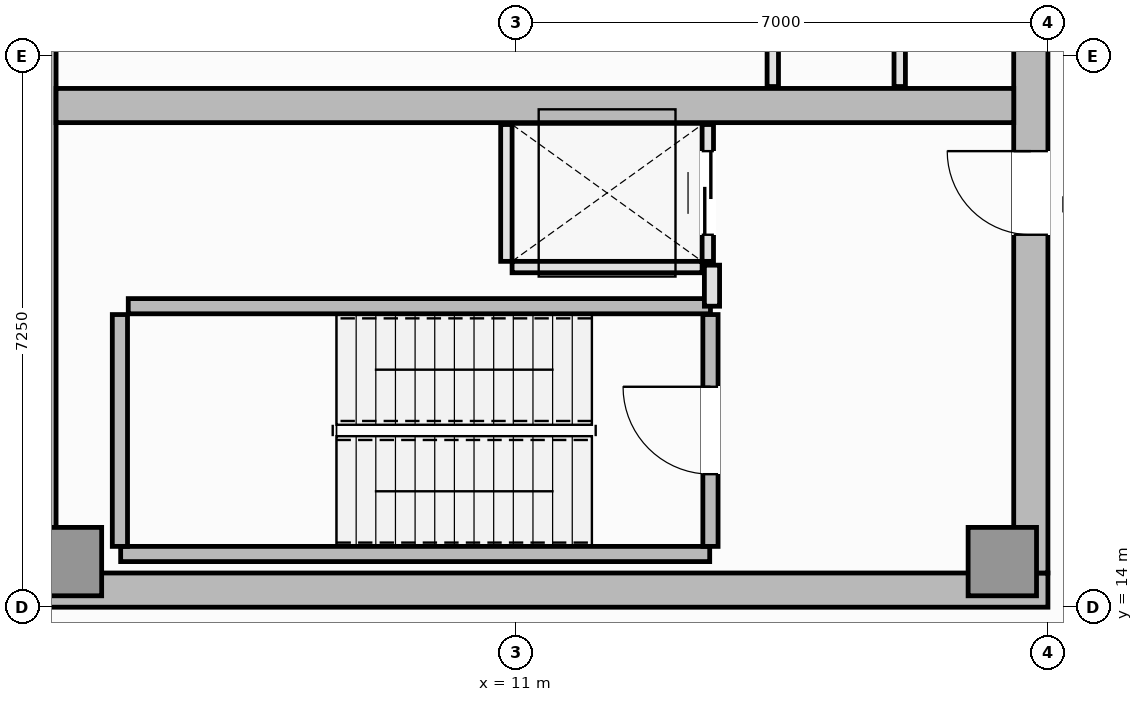
"""IFC4 building model, lengths in metres.
Left out: names, types, materials, properties, quantities, classifications, styles, units other than length and angle.
Written with IfcOpenShell. Run it as: python <this file> out.ifc"""

import sys

from ifc_helpers import new_model, si_unit, direction, frame, frame_2d, origin, origin_2d, place, context, subcontext, project, spatial, rectangle, extrude, element, fill, save


model = new_model("IFC4")
c1 = context("Model", 3, precision=1e-05, world=origin(), true_north=direction((0.0, 1.0)))
c2 = subcontext(c1, "Body", "Model", "MODEL_VIEW")
j1 = project(units=[si_unit("LENGTHUNIT", "METRE"), si_unit("PLANEANGLEUNIT", "RADIAN")], contexts=[c1])
p1 = place(None, origin())
s1 = spatial("IfcSite", under=j1, at=p1, CompositionType="ELEMENT")
p2 = place(p1, origin())
s2 = spatial("IfcBuilding", under=s1, at=p2, CompositionType="ELEMENT")
p3 = place(p2, frame((0.0, 0.0, 303.05)))
s3 = spatial("IfcBuildingStorey", under=s2, at=p3, CompositionType="ELEMENT", Elevation=303.05)
p4 = place(p3, frame((4.5, 14.225, 0.0), z_axis=(0.0, 0.0, 1.0), x_axis=(1.0, 0.0, 0.0)))
e1 = element("IfcWall", 1, at=p4, inside=s3, PredefinedType="SHEAR", context=c2, shape_type="SweptSolid", body=[
    extrude(rectangle(XDim=13.5, YDim=0.45, at=frame_2d((6.75, 0.0))), origin(), (0.0, 0.0, 1.0), 4.5),
])
p5 = place(p3, frame((4.725, 14.45, 0.0), z_axis=(0.0, 0.0, 1.0), x_axis=(0.0, 1.0, 0.0)))
e2 = element("IfcWall", 2, at=p5, inside=s3, PredefinedType="SHEAR", context=c2, shape_type="SweptSolid", body=[
    extrude(rectangle(XDim=21.6, YDim=0.45, at=frame_2d((10.8, 0.0))), origin(), (0.0, 0.0, 1.0), 4.5),
])
p6 = place(p3, frame((17.775, 14.45, 0.0), z_axis=(0.0, 0.0, 1.0), x_axis=(0.0, 1.0, 0.0)))
e3 = element("IfcWall", 3, at=p6, inside=s3, PredefinedType="SHEAR", context=c2, shape_type="SweptSolid", body=[
    extrude(rectangle(XDim=9.0, YDim=0.45, at=frame_2d((4.5, 0.0))), origin(), (0.0, 0.0, 1.0), 4.5),
])
p7 = place(p6, frame((4.45, 0.0, 0.0)))
e4 = element("IfcOpeningElement", 4, at=p7, cuts=e3, PredefinedType="OPENING", context=c2, shape_type="SweptSolid", body=[
    extrude(rectangle(XDim=1.1, YDim=2.15, at=frame_2d((0.55, 1.075))), frame((0.0, 0.235, 0.0), z_axis=(0.0, -1.0, 0.0), x_axis=(1.0, 0.0, 0.0)), (0.0, 0.0, 1.0), 0.47),
])
p8 = place(p3, frame((4.95, 20.6, 0.0), z_axis=(0.0, 0.0, 1.0), x_axis=(1.0, 0.0, 0.0)))
e5 = element("IfcWall", 5, at=p8, inside=s3, PredefinedType="SHEAR", context=c2, shape_type="SweptSolid", body=[
    extrude(rectangle(XDim=12.6, YDim=0.45, at=frame_2d((6.3, 0.0))), origin(), (0.0, 0.0, 1.0), 4.5),
])
for number, where, z_axis, x_axis in (
    (6, (5.1, 14.6, 0.0), (0.0, 0.0, 1.0), (1.0, 0.0, 0.0)),
    (7, (17.4, 14.6, 0.0), (0.0, 0.0, 1.0), (1.0, 0.0, 0.0)),
):
    element("IfcColumn", number, at=place(p3, frame(where, z_axis=z_axis, x_axis=x_axis)), inside=s3, PredefinedType="PILASTER", context=c2, shape_type="SweptSolid", body=[
        extrude(rectangle(XDim=0.9, YDim=0.9, at=origin_2d()), origin(), (0.0, 0.0, 1.0), 4.5),
    ])
p9 = place(p3, frame((5.8, 14.7, 0.0), z_axis=(0.0, 0.0, 1.0), x_axis=(1.0, 0.0, 0.0)))
e8 = element("IfcWall", 8, at=p9, inside=s3, PredefinedType="SOLIDWALL", context=c2, shape_type="SweptSolid", body=[
    extrude(rectangle(XDim=7.75, YDim=0.2, at=frame_2d((3.875, 0.0))), origin(), (0.0, 0.0, 1.0), 4.5),
])
p10 = place(p3, frame((5.79, 14.8, 0.0), z_axis=(0.0, 0.0, 1.0), x_axis=(0.0, 1.0, 0.0)))
e9 = element("IfcWall", 9, at=p10, inside=s3, PredefinedType="SOLIDWALL", context=c2, shape_type="SweptSolid", body=[
    extrude(rectangle(XDim=3.05, YDim=0.2, at=frame_2d((1.525, 0.0))), origin(), (0.0, 0.0, 1.0), 4.5),
])
p11 = place(p3, frame((5.9, 17.96, 0.0), z_axis=(0.0, 0.0, 1.0), x_axis=(1.0, 0.0, 0.0)))
e10 = element("IfcWall", 10, at=p11, inside=s3, PredefinedType="SOLIDWALL", context=c2, shape_type="SweptSolid", body=[
    extrude(rectangle(XDim=7.66, YDim=0.2, at=frame_2d((3.83, 0.0))), origin(), (0.0, 0.0, 1.0), 4.5),
])
p12 = place(p3, frame((13.56, 14.8, 0.0), z_axis=(0.0, 0.0, 1.0), x_axis=(0.0, 1.0, 0.0)))
e11 = element("IfcWall", 11, at=p12, inside=s3, PredefinedType="SOLIDWALL", context=c2, shape_type="SweptSolid", body=[
    extrude(rectangle(XDim=3.05, YDim=0.2, at=frame_2d((1.525, 0.0))), origin(), (0.0, 0.0, 1.0), 4.5),
])
p13 = place(p12, frame((0.95, 0.0, 0.0)))
e12 = element("IfcOpeningElement", 12, at=p13, cuts=e11, PredefinedType="OPENING", context=c2, shape_type="SweptSolid", body=[
    extrude(rectangle(XDim=1.15, YDim=2.15, at=frame_2d((0.575, 1.075))), frame((0.0, 0.11, 0.0), z_axis=(0.0, -1.0, 0.0), x_axis=(1.0, 0.0, 0.0)), (0.0, 0.0, 1.0), 0.22),
])
p14 = place(p3, frame((10.95, 18.475, 0.0), z_axis=(0.0, 0.0, 1.0), x_axis=(1.0, 0.0, 0.0)))
e13 = element("IfcWall", 13, at=p14, inside=s3, PredefinedType="PARTITIONING", context=c2, shape_type="SweptSolid", body=[
    extrude(rectangle(XDim=2.5, YDim=0.15, at=frame_2d((1.25, 0.0))), origin(), (0.0, 0.0, 1.0), 4.3),
])
p15 = place(p3, frame((10.875, 18.55, 0.0), z_axis=(0.0, 0.0, 1.0), x_axis=(0.0, 1.0, 0.0)))
e14 = element("IfcWall", 14, at=p15, inside=s3, PredefinedType="PARTITIONING", context=c2, shape_type="SweptSolid", body=[
    extrude(rectangle(XDim=1.8, YDim=0.15, at=frame_2d((0.9, 0.0))), origin(), (0.0, 0.0, 1.0), 4.3),
])
p16 = place(p3, frame((13.525, 18.55, 0.0), z_axis=(0.0, 0.0, 1.0), x_axis=(0.0, 1.0, 0.0)))
e15 = element("IfcWall", 15, at=p16, inside=s3, PredefinedType="PARTITIONING", context=c2, shape_type="SweptSolid", body=[
    extrude(rectangle(XDim=1.8, YDim=0.15, at=frame_2d((0.9, 0.0))), origin(), (0.0, 0.0, 1.0), 4.3),
])
p17 = place(p16, frame((0.35, 0.0, 0.0)))
e16 = element("IfcOpeningElement", 16, at=p17, cuts=e15, PredefinedType="OPENING", context=c2, shape_type="SweptSolid", body=[
    extrude(rectangle(XDim=1.1, YDim=2.2, at=frame_2d((0.55, 1.1))), frame((0.0, 0.085, 0.0), z_axis=(0.0, -1.0, 0.0), x_axis=(1.0, 0.0, 0.0)), (0.0, 0.0, 1.0), 0.17),
])
p18 = place(p3, frame((13.58, 17.96, 0.0), z_axis=(0.0, 0.0, 1.0), x_axis=(0.0, 1.0, 0.0)))
e17 = element("IfcWall", 17, at=p18, inside=s3, PredefinedType="PARTITIONING", context=c2, shape_type="SweptSolid", body=[
    extrude(rectangle(XDim=0.54, YDim=0.2, at=frame_2d((0.27, 0.0))), origin(), (0.0, 0.0, 1.0), 4.3),
])
p19 = place(p3, frame((14.38, 20.85, 0.0), z_axis=(0.0, 0.0, 1.0), x_axis=(0.0, 1.0, 0.0)))
e18 = element("IfcWall", 18, at=p19, inside=s3, PredefinedType="PARTITIONING", context=c2, shape_type="SweptSolid", body=[
    extrude(rectangle(XDim=2.67, YDim=0.15, at=frame_2d((1.335, 0.0))), origin(), (0.0, 0.0, 1.0), 4.3),
])
p20 = place(p3, frame((16.05, 20.85, 0.0), z_axis=(0.0, 0.0, 1.0), x_axis=(0.0, 1.0, 0.0)))
e19 = element("IfcWall", 19, at=p20, inside=s3, PredefinedType="PARTITIONING", context=c2, shape_type="SweptSolid", body=[
    extrude(rectangle(XDim=2.67, YDim=0.15, at=frame_2d((1.335, 0.0))), origin(), (0.0, 0.0, 1.0), 4.3),
])
p21 = place(p20, frame((0.885, 0.0, 0.0)))
e20 = element("IfcOpeningElement", 20, at=p21, cuts=e19, PredefinedType="OPENING", context=c2, shape_type="SweptSolid", body=[
    extrude(rectangle(XDim=0.9, YDim=2.1, at=frame_2d((0.45, 1.05))), frame((0.0, 0.085, 0.0), z_axis=(0.0, -1.0, 0.0), x_axis=(1.0, 0.0, 0.0)), (0.0, 0.0, 1.0), 0.17),
])
p22 = place(p13, origin())
e21 = element("IfcDoor", 21, at=p22, inside=s3, OperationType="SINGLE_SWING_RIGHT", PredefinedType="DOOR", context=c2, shape_type="SweptSolid", body=[
    extrude(rectangle(XDim=1.15, YDim=2.15, at=frame_2d((0.575, 1.075))), frame((0.0, 0.025, 0.0), z_axis=(0.0, -1.0, 0.0), x_axis=(1.0, 0.0, 0.0)), (0.0, 0.0, 1.0), 0.05),
])
fill(e12, e21)
p23 = place(p17, origin())
e22 = element("IfcDoor", 22, at=p23, inside=s3, OperationType="DOUBLE_DOOR_SLIDING", PredefinedType="DOOR", context=c2, shape_type="SweptSolid", body=[
    extrude(rectangle(XDim=1.1, YDim=2.2, at=frame_2d((0.55, 1.1))), frame((0.0, 0.025, 0.0), z_axis=(0.0, -1.0, 0.0), x_axis=(1.0, 0.0, 0.0)), (0.0, 0.0, 1.0), 0.05),
])
fill(e16, e22)
p24 = place(p7, origin())
e23 = element("IfcDoor", 23, at=p24, inside=s3, OperationType="SINGLE_SWING_RIGHT", PredefinedType="DOOR", context=c2, shape_type="SweptSolid", body=[
    extrude(rectangle(XDim=1.1, YDim=2.15, at=frame_2d((0.55, 1.075))), frame((0.0, 0.025, 0.0), z_axis=(0.0, -1.0, 0.0), x_axis=(1.0, 0.0, 0.0)), (0.0, 0.0, 1.0), 0.05),
])
fill(e4, e23)
save(model, sys.argv[1])
